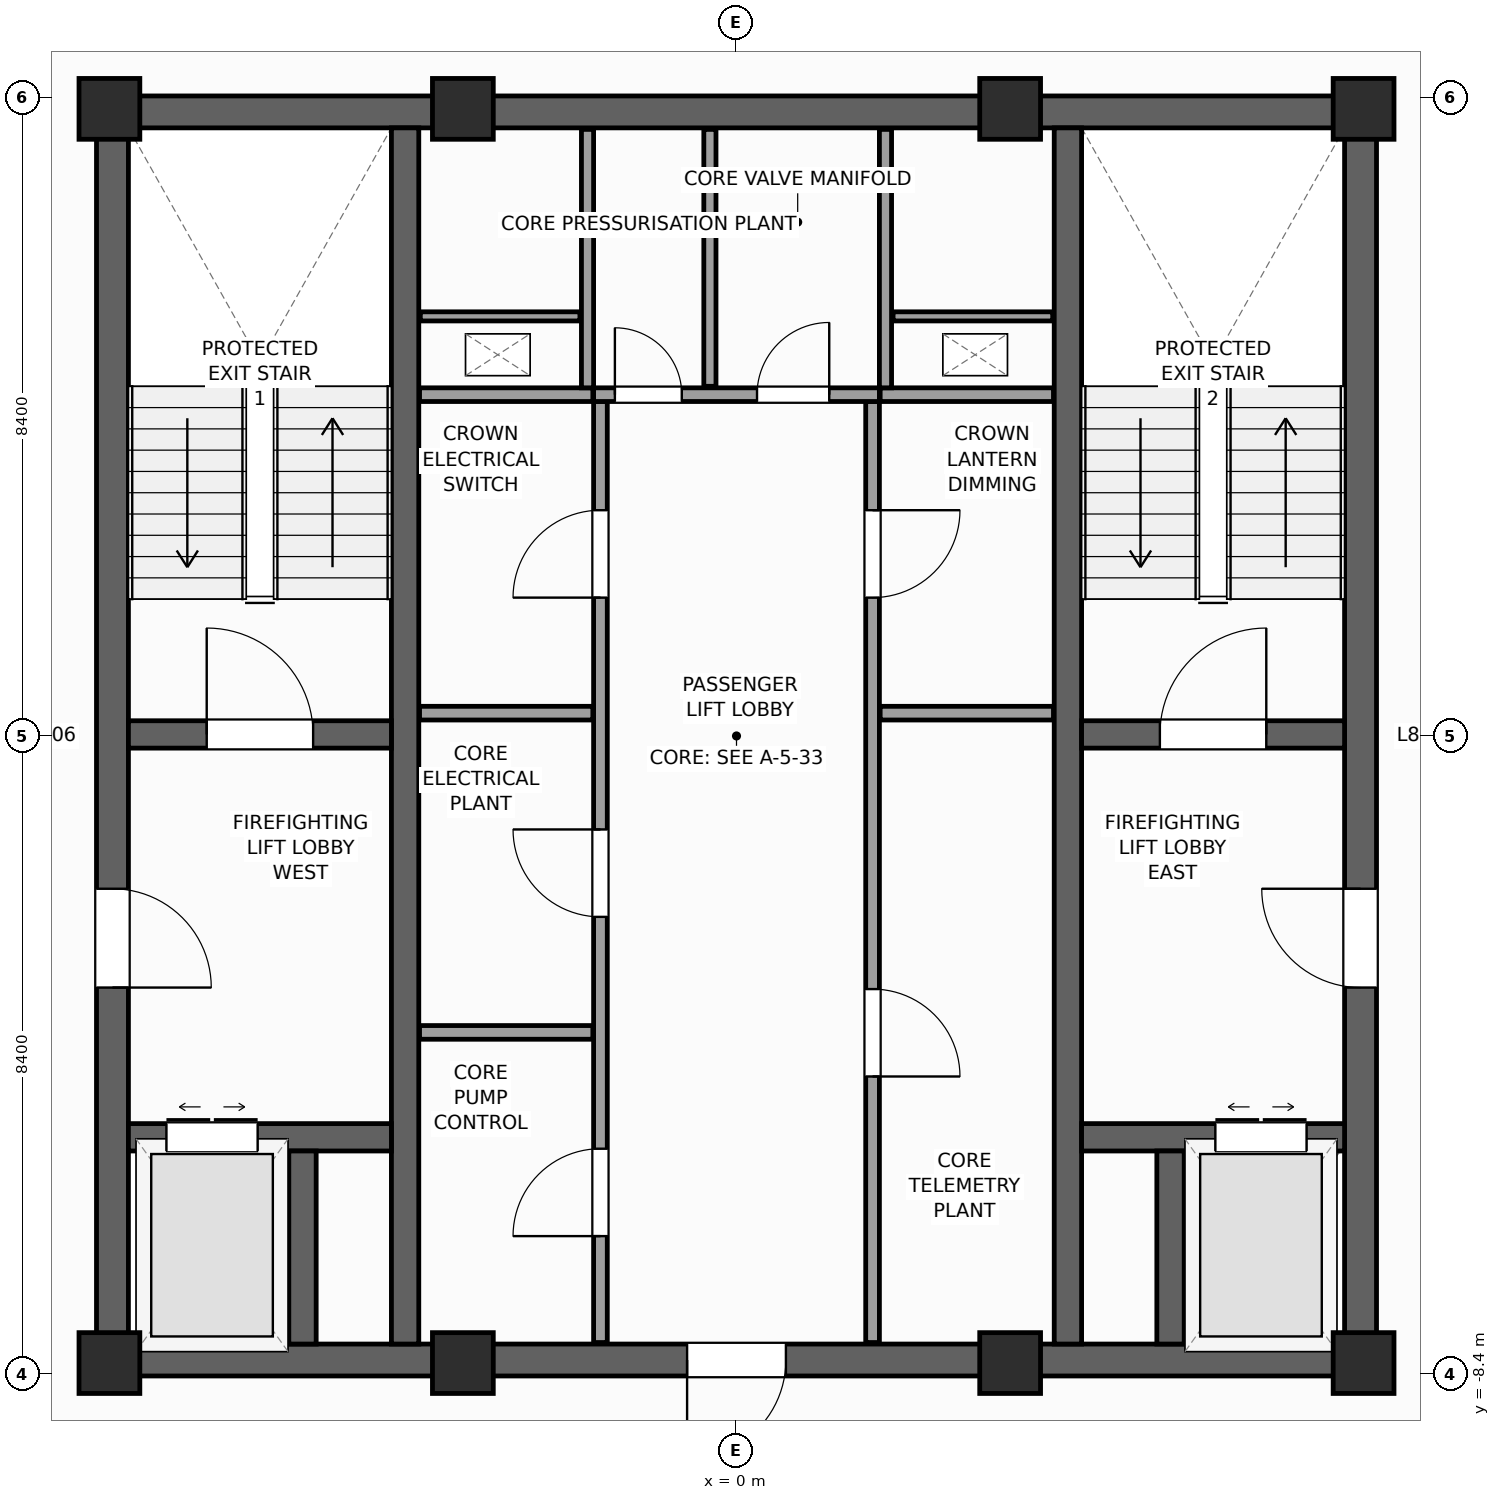
"""IFC4 building model, lengths in metres.
Left out: names, types, materials, properties, quantities, classifications, styles, units other than length and angle.
Written with IfcOpenShell. Run it as: python <this file> out.ifc"""

import sys

from ifc_helpers import new_model, si_unit, direction, frame, frame_2d, origin, origin_2d, place, context, subcontext, project, spatial, rectangle, extrude, source, transform, mapped, element, fill, save


model = new_model("IFC4")
c1 = context("Model", 3, precision=1e-05, world=origin(), true_north=direction((0.0, 1.0)))
c2 = subcontext(c1, "Body", "Model", "MODEL_VIEW")
j1 = project(units=[si_unit("LENGTHUNIT", "METRE"), si_unit("PLANEANGLEUNIT", "RADIAN")], contexts=[c1])
p1 = place(None, origin())
s1 = spatial("IfcSite", under=j1, at=p1, CompositionType="ELEMENT")
p2 = place(p1, origin())
s2 = spatial("IfcBuilding", under=s1, at=p2, CompositionType="ELEMENT")
p3 = place(p2, frame((0.0, 0.0, 325.6)))
s3 = spatial("IfcBuildingStorey", under=s2, at=p3, CompositionType="ELEMENT", Elevation=325.6)
p4 = place(p3, frame((-8.42, -8.21, 0.0), z_axis=(0.0, 0.0, 1.0), x_axis=(1.0, 0.0, 0.0)))
e1 = element("IfcWall", 1, at=p4, inside=s3, PredefinedType="SHEAR", context=c2, shape_type="SweptSolid", body=[
    extrude(rectangle(XDim=16.84, YDim=0.42, at=frame_2d((8.42, 0.0))), origin(), (0.0, 0.0, 1.0), 4.0),
])
p5 = place(p4, frame((7.77, 0.0, 0.0)))
e2 = element("IfcOpeningElement", 2, at=p5, cuts=e1, PredefinedType="OPENING", context=c2, shape_type="SweptSolid", body=[
    extrude(rectangle(XDim=1.3, YDim=2.2, at=frame_2d((0.65, 1.1))), frame((0.0, 0.22, 0.0), z_axis=(0.0, -1.0, 0.0), x_axis=(1.0, 0.0, 0.0)), (0.0, 0.0, 1.0), 0.44),
])
p6 = place(p3, frame((-8.42, 8.21, 0.0), z_axis=(0.0, 0.0, 1.0), x_axis=(1.0, 0.0, 0.0)))
e3 = element("IfcWall", 3, at=p6, inside=s3, PredefinedType="SHEAR", context=c2, shape_type="SweptSolid", body=[
    extrude(rectangle(XDim=16.84, YDim=0.42, at=frame_2d((8.42, 0.0))), origin(), (0.0, 0.0, 1.0), 4.0),
])
p7 = place(p3, frame((-8.21, -8.0, 0.0), z_axis=(0.0, 0.0, 1.0), x_axis=(0.0, 1.0, 0.0)))
e4 = element("IfcWall", 4, at=p7, inside=s3, PredefinedType="SHEAR", context=c2, shape_type="SweptSolid", body=[
    extrude(rectangle(XDim=16.0, YDim=0.42, at=frame_2d((8.0, 0.0))), origin(), (0.0, 0.0, 1.0), 4.0),
])
p8 = place(p7, frame((4.69, 0.0, 0.0)))
e5 = element("IfcOpeningElement", 5, at=p8, cuts=e4, PredefinedType="OPENING", context=c2, shape_type="SweptSolid", body=[
    extrude(rectangle(XDim=1.3, YDim=2.2, at=frame_2d((0.65, 1.1))), frame((0.0, 0.22, 0.0), z_axis=(0.0, -1.0, 0.0), x_axis=(1.0, 0.0, 0.0)), (0.0, 0.0, 1.0), 0.44),
])
p9 = place(p3, frame((8.21, -8.0, 0.0), z_axis=(0.0, 0.0, 1.0), x_axis=(0.0, 1.0, 0.0)))
e6 = element("IfcWall", 6, at=p9, inside=s3, PredefinedType="SHEAR", context=c2, shape_type="SweptSolid", body=[
    extrude(rectangle(XDim=16.0, YDim=0.42, at=frame_2d((8.0, 0.0))), origin(), (0.0, 0.0, 1.0), 4.0),
])
p10 = place(p9, frame((4.69, 0.0, 0.0)))
e7 = element("IfcOpeningElement", 7, at=p10, cuts=e6, PredefinedType="OPENING", context=c2, shape_type="SweptSolid", body=[
    extrude(rectangle(XDim=1.3, YDim=2.2, at=frame_2d((0.65, 1.1))), frame((0.0, 0.22, 0.0), z_axis=(0.0, -1.0, 0.0), x_axis=(1.0, 0.0, 0.0)), (0.0, 0.0, 1.0), 0.44),
])
for number, where, z_axis, x_axis in (
    (8, (-4.36, -8.0, 0.0), (0.0, 0.0, 1.0), (0.0, 1.0, 0.0)),
    (9, (4.36, -8.0, 0.0), (0.0, 0.0, 1.0), (0.0, 1.0, 0.0)),
):
    element("IfcWall", number, at=place(p3, frame(where, z_axis=z_axis, x_axis=x_axis)), inside=s3, PredefinedType="SHEAR", context=c2, shape_type="SweptSolid", body=[
        extrude(rectangle(XDim=16.0, YDim=0.36, at=frame_2d((8.0, 0.0))), origin(), (0.0, 0.0, 1.0), 4.0),
    ])
p11 = place(p3, frame((-8.0, 0.02, 0.0), z_axis=(0.0, 0.0, 1.0), x_axis=(1.0, 0.0, 0.0)))
e10 = element("IfcWall", 10, at=p11, inside=s3, PredefinedType="SHEAR", context=c2, shape_type="SweptSolid", body=[
    extrude(rectangle(XDim=3.46, YDim=0.36, at=frame_2d((1.73, 0.0))), origin(), (0.0, 0.0, 1.0), 4.0),
])
p12 = place(p11, frame((1.03, 0.0, 0.0)))
e11 = element("IfcOpeningElement", 11, at=p12, cuts=e10, PredefinedType="OPENING", context=c2, shape_type="SweptSolid", body=[
    extrude(rectangle(XDim=1.4, YDim=2.2, at=frame_2d((0.7, 1.1))), frame((0.0, 0.19, 0.0), z_axis=(0.0, -1.0, 0.0), x_axis=(1.0, 0.0, 0.0)), (0.0, 0.0, 1.0), 0.38),
])
p13 = place(p3, frame((4.54, 0.02, 0.0), z_axis=(0.0, 0.0, 1.0), x_axis=(1.0, 0.0, 0.0)))
e12 = element("IfcWall", 12, at=p13, inside=s3, PredefinedType="SHEAR", context=c2, shape_type="SweptSolid", body=[
    extrude(rectangle(XDim=3.46, YDim=0.36, at=frame_2d((1.73, 0.0))), origin(), (0.0, 0.0, 1.0), 4.0),
])
p14 = place(p13, frame((1.03, 0.0, 0.0)))
e13 = element("IfcOpeningElement", 13, at=p14, cuts=e12, PredefinedType="OPENING", context=c2, shape_type="SweptSolid", body=[
    extrude(rectangle(XDim=1.4, YDim=2.2, at=frame_2d((0.7, 1.1))), frame((0.0, 0.19, 0.0), z_axis=(0.0, -1.0, 0.0), x_axis=(1.0, 0.0, 0.0)), (0.0, 0.0, 1.0), 0.38),
])
p15 = place(p3, frame((-8.0, -5.28, 0.0), z_axis=(0.0, 0.0, 1.0), x_axis=(1.0, 0.0, 0.0)))
e14 = element("IfcWall", 14, at=p15, inside=s3, PredefinedType="SHEAR", context=c2, shape_type="SweptSolid", body=[
    extrude(rectangle(XDim=3.46, YDim=0.36, at=frame_2d((1.73, 0.0))), origin(), (0.0, 0.0, 1.0), 4.0),
])
p16 = place(p15, frame((0.5, 0.0, 0.0)))
e15 = element("IfcOpeningElement", 15, at=p16, cuts=e14, PredefinedType="OPENING", context=c2, shape_type="SweptSolid", body=[
    extrude(rectangle(XDim=1.2, YDim=2.25, at=frame_2d((0.6, 1.125))), frame((0.0, 0.19, 0.0), z_axis=(0.0, -1.0, 0.0), x_axis=(1.0, 0.0, 0.0)), (0.0, 0.0, 1.0), 0.38),
])
p17 = place(p3, frame((4.54, -5.28, 0.0), z_axis=(0.0, 0.0, 1.0), x_axis=(1.0, 0.0, 0.0)))
e16 = element("IfcWall", 16, at=p17, inside=s3, PredefinedType="SHEAR", context=c2, shape_type="SweptSolid", body=[
    extrude(rectangle(XDim=3.46, YDim=0.36, at=frame_2d((1.73, 0.0))), origin(), (0.0, 0.0, 1.0), 4.0),
])
p18 = place(p17, frame((1.76, 0.0, 0.0)))
e17 = element("IfcOpeningElement", 17, at=p18, cuts=e16, PredefinedType="OPENING", context=c2, shape_type="SweptSolid", body=[
    extrude(rectangle(XDim=1.2, YDim=2.25, at=frame_2d((0.6, 1.125))), frame((0.0, 0.19, 0.0), z_axis=(0.0, -1.0, 0.0), x_axis=(1.0, 0.0, 0.0)), (0.0, 0.0, 1.0), 0.38),
])
for number, where, z_axis, x_axis in (
    (18, (-5.71, -8.0, 0.0), (0.0, 0.0, 1.0), (0.0, 1.0, 0.0)),
    (19, (5.71, -8.0, 0.0), (0.0, 0.0, 1.0), (0.0, 1.0, 0.0)),
):
    element("IfcWall", number, at=place(p3, frame(where, z_axis=z_axis, x_axis=x_axis)), inside=s3, PredefinedType="SHEAR", context=c2, shape_type="SweptSolid", body=[
        extrude(rectangle(XDim=2.54, YDim=0.36, at=frame_2d((1.27, 0.0))), origin(), (0.0, 0.0, 1.0), 4.0),
    ])
m1 = source(origin(), c2, "Body", "SweptSolid", [
    extrude(rectangle(XDim=0.8, YDim=0.8, at=origin_2d()), origin(), (0.0, 0.0, 1.0), 4.0),
])
for number, where, z_axis, x_axis in (
    (20, (-8.25, -8.25, 0.0), (0.0, 0.0, 1.0), (1.0, 0.0, 0.0)),
    (21, (8.25, -8.25, 0.0), (0.0, 0.0, 1.0), (1.0, 0.0, 0.0)),
    (22, (8.25, 8.25, 0.0), (0.0, 0.0, 1.0), (1.0, 0.0, 0.0)),
    (23, (-8.25, 8.25, 0.0), (0.0, 0.0, 1.0), (1.0, 0.0, 0.0)),
    (24, (-3.6, -8.25, 0.0), (0.0, 0.0, 1.0), (1.0, 0.0, 0.0)),
    (25, (3.6, -8.25, 0.0), (0.0, 0.0, 1.0), (1.0, 0.0, 0.0)),
    (26, (-3.6, 8.25, 0.0), (0.0, 0.0, 1.0), (1.0, 0.0, 0.0)),
    (27, (3.6, 8.25, 0.0), (0.0, 0.0, 1.0), (1.0, 0.0, 0.0)),
):
    element("IfcColumn", number, at=place(p3, frame(where, z_axis=z_axis, x_axis=x_axis)), inside=s3, PredefinedType="PILASTER", context=c2, shape_type="MappedRepresentation", body=[
        mapped(m1, transform((0.0, 0.0, 0.0), scale=1.0)),
    ])
p19 = place(p3, frame((-1.79, -7.98, 0.0), z_axis=(0.0, 0.0, 1.0), x_axis=(0.0, 1.0, 0.0)))
e28 = element("IfcWall", 28, at=p19, inside=s3, PredefinedType="PARTITIONING", context=c2, shape_type="SweptSolid", body=[
    extrude(rectangle(XDim=12.38, YDim=0.18, at=frame_2d((6.19, 0.0))), origin(), (0.0, 0.0, 1.0), 3.7),
])
p20 = place(p19, frame((1.4, 0.0, 0.0)))
e29 = element("IfcOpeningElement", 29, at=p20, cuts=e28, PredefinedType="OPENING", context=c2, shape_type="SweptSolid", body=[
    extrude(rectangle(XDim=1.15, YDim=2.25, at=frame_2d((0.575, 1.125))), frame((0.0, 0.1, 0.0), z_axis=(0.0, -1.0, 0.0), x_axis=(1.0, 0.0, 0.0)), (0.0, 0.0, 1.0), 0.2),
])
p21 = place(p19, frame((5.6, 0.0, 0.0)))
e30 = element("IfcOpeningElement", 30, at=p21, cuts=e28, PredefinedType="OPENING", context=c2, shape_type="SweptSolid", body=[
    extrude(rectangle(XDim=1.15, YDim=2.25, at=frame_2d((0.575, 1.125))), frame((0.0, 0.1, 0.0), z_axis=(0.0, -1.0, 0.0), x_axis=(1.0, 0.0, 0.0)), (0.0, 0.0, 1.0), 0.2),
])
p22 = place(p19, frame((9.8, 0.0, 0.0)))
e31 = element("IfcOpeningElement", 31, at=p22, cuts=e28, PredefinedType="OPENING", context=c2, shape_type="SweptSolid", body=[
    extrude(rectangle(XDim=1.15, YDim=2.25, at=frame_2d((0.575, 1.125))), frame((0.0, 0.1, 0.0), z_axis=(0.0, -1.0, 0.0), x_axis=(1.0, 0.0, 0.0)), (0.0, 0.0, 1.0), 0.2),
])
p23 = place(p3, frame((1.79, -7.98, 0.0), z_axis=(0.0, 0.0, 1.0), x_axis=(0.0, 1.0, 0.0)))
e32 = element("IfcWall", 32, at=p23, inside=s3, PredefinedType="PARTITIONING", context=c2, shape_type="SweptSolid", body=[
    extrude(rectangle(XDim=12.38, YDim=0.18, at=frame_2d((6.19, 0.0))), origin(), (0.0, 0.0, 1.0), 3.7),
])
p24 = place(p23, frame((3.5, 0.0, 0.0)))
e33 = element("IfcOpeningElement", 33, at=p24, cuts=e32, PredefinedType="OPENING", context=c2, shape_type="SweptSolid", body=[
    extrude(rectangle(XDim=1.15, YDim=2.25, at=frame_2d((0.575, 1.125))), frame((0.0, 0.1, 0.0), z_axis=(0.0, -1.0, 0.0), x_axis=(1.0, 0.0, 0.0)), (0.0, 0.0, 1.0), 0.2),
])
p25 = place(p23, frame((9.8, 0.0, 0.0)))
e34 = element("IfcOpeningElement", 34, at=p25, cuts=e32, PredefinedType="OPENING", context=c2, shape_type="SweptSolid", body=[
    extrude(rectangle(XDim=1.15, YDim=2.25, at=frame_2d((0.575, 1.125))), frame((0.0, 0.1, 0.0), z_axis=(0.0, -1.0, 0.0), x_axis=(1.0, 0.0, 0.0)), (0.0, 0.0, 1.0), 0.2),
])
p26 = place(p3, frame((-1.88, 4.49, 0.0), z_axis=(0.0, 0.0, 1.0), x_axis=(1.0, 0.0, 0.0)))
e35 = element("IfcWall", 35, at=p26, inside=s3, PredefinedType="PARTITIONING", context=c2, shape_type="SweptSolid", body=[
    extrude(rectangle(XDim=3.76, YDim=0.18, at=frame_2d((1.88, 0.0))), origin(), (0.0, 0.0, 1.0), 3.7),
])
p27 = place(p26, frame((0.28, 0.0, 0.0)))
e36 = element("IfcOpeningElement", 36, at=p27, cuts=e35, PredefinedType="OPENING", context=c2, shape_type="SweptSolid", body=[
    extrude(rectangle(XDim=0.88, YDim=2.1, at=frame_2d((0.44, 1.05))), frame((0.0, 0.1, 0.0), z_axis=(0.0, -1.0, 0.0), x_axis=(1.0, 0.0, 0.0)), (0.0, 0.0, 1.0), 0.2),
])
p28 = place(p26, frame((2.15, 0.0, 0.0)))
e37 = element("IfcOpeningElement", 37, at=p28, cuts=e35, PredefinedType="OPENING", context=c2, shape_type="SweptSolid", body=[
    extrude(rectangle(XDim=0.95, YDim=2.1, at=frame_2d((0.475, 1.05))), frame((0.0, 0.1, 0.0), z_axis=(0.0, -1.0, 0.0), x_axis=(1.0, 0.0, 0.0)), (0.0, 0.0, 1.0), 0.2),
])
for number, where, z_axis, x_axis in (
    (38, (-4.17, -3.9, 0.0), (0.0, 0.0, 1.0), (1.0, 0.0, 0.0)),
    (39, (-4.17, 0.3, 0.0), (0.0, 0.0, 1.0), (1.0, 0.0, 0.0)),
    (40, (1.89, 0.3, 0.0), (0.0, 0.0, 1.0), (1.0, 0.0, 0.0)),
    (41, (-4.17, 4.49, 0.0), (0.0, 0.0, 1.0), (1.0, 0.0, 0.0)),
    (42, (1.89, 4.49, 0.0), (0.0, 0.0, 1.0), (1.0, 0.0, 0.0)),
):
    element("IfcWall", number, at=place(p3, frame(where, z_axis=z_axis, x_axis=x_axis)), inside=s3, PredefinedType="PARTITIONING", context=c2, shape_type="SweptSolid", body=[
        extrude(rectangle(XDim=2.28, YDim=0.18, at=frame_2d((1.14, 0.0))), origin(), (0.0, 0.0, 1.0), 3.7),
    ])
for number, where, z_axis, x_axis in (
    (43, (-1.96, 4.58, 0.0), (0.0, 0.0, 1.0), (0.0, 1.0, 0.0)),
    (44, (1.96, 4.58, 0.0), (0.0, 0.0, 1.0), (0.0, 1.0, 0.0)),
):
    element("IfcWall", number, at=place(p3, frame(where, z_axis=z_axis, x_axis=x_axis)), inside=s3, PredefinedType="PARTITIONING", context=c2, shape_type="SweptSolid", body=[
        extrude(rectangle(XDim=3.4, YDim=0.16, at=frame_2d((1.7, 0.0))), origin(), (0.0, 0.0, 1.0), 3.7),
    ])
for number, where, z_axis, x_axis in (
    (45, (-4.16, 5.52, 0.0), (0.0, 0.0, 1.0), (1.0, 0.0, 0.0)),
    (46, (2.06, 5.52, 0.0), (0.0, 0.0, 1.0), (1.0, 0.0, 0.0)),
):
    element("IfcWall", number, at=place(p3, frame(where, z_axis=z_axis, x_axis=x_axis)), inside=s3, PredefinedType="PARTITIONING", context=c2, shape_type="SweptSolid", body=[
        extrude(rectangle(XDim=2.1, YDim=0.12, at=frame_2d((1.05, 0.0))), origin(), (0.0, 0.0, 1.0), 3.7),
    ])
p29 = place(p3, frame((-0.35, 4.6, 0.0), z_axis=(0.0, 0.0, 1.0), x_axis=(0.0, 1.0, 0.0)))
e47 = element("IfcWall", 47, at=p29, inside=s3, PredefinedType="PARTITIONING", context=c2, shape_type="SweptSolid", body=[
    extrude(rectangle(XDim=3.38, YDim=0.16, at=frame_2d((1.69, 0.0))), origin(), (0.0, 0.0, 1.0), 3.7),
])
m2 = source(origin(), c2, "Body", "SweptSolid", [
    extrude(rectangle(XDim=1.4, YDim=2.2, at=frame_2d((0.7, 1.1))), frame((0.0, 0.025, 0.0), z_axis=(0.0, -1.0, 0.0), x_axis=(1.0, 0.0, 0.0)), (0.0, 0.0, 1.0), 0.05),
])
p30 = place(p12, origin())
e48 = element("IfcDoor", 48, at=p30, inside=s3, OperationType="SINGLE_SWING_LEFT", PredefinedType="DOOR", context=c2, shape_type="MappedRepresentation", body=[
    mapped(m2, transform((0.0, 0.0, 0.0), scale=1.0)),
])
fill(e11, e48)
p31 = place(p14, origin())
e49 = element("IfcDoor", 49, at=p31, inside=s3, OperationType="SINGLE_SWING_RIGHT", PredefinedType="DOOR", context=c2, shape_type="MappedRepresentation", body=[
    mapped(m2, transform((0.0, 0.0, 0.0), scale=1.0)),
])
fill(e13, e49)
m3 = source(origin(), c2, "Body", "SweptSolid", [
    extrude(rectangle(XDim=1.3, YDim=2.2, at=frame_2d((0.65, 1.1))), frame((0.0, 0.025, 0.0), z_axis=(0.0, -1.0, 0.0), x_axis=(1.0, 0.0, 0.0)), (0.0, 0.0, 1.0), 0.05),
])
p32 = place(p8, frame((1.3, 0.0, 0.0), z_axis=(0.0, 0.0, 1.0), x_axis=(-1.0, 0.0, 0.0)))
e50 = element("IfcDoor", 50, at=p32, inside=s3, OperationType="SINGLE_SWING_LEFT", PredefinedType="DOOR", context=c2, shape_type="MappedRepresentation", body=[
    mapped(m3, transform((0.0, 0.0, 0.0), scale=1.0)),
])
fill(e5, e50)
p33 = place(p10, origin())
e51 = element("IfcDoor", 51, at=p33, inside=s3, OperationType="SINGLE_SWING_RIGHT", PredefinedType="DOOR", context=c2, shape_type="MappedRepresentation", body=[
    mapped(m3, transform((0.0, 0.0, 0.0), scale=1.0)),
])
fill(e7, e51)
p34 = place(p5, frame((1.3, 0.0, 0.0), z_axis=(0.0, 0.0, 1.0), x_axis=(-1.0, 0.0, 0.0)))
e52 = element("IfcDoor", 52, at=p34, inside=s3, OperationType="SINGLE_SWING_LEFT", PredefinedType="DOOR", context=c2, shape_type="MappedRepresentation", body=[
    mapped(m3, transform((0.0, 0.0, 0.0), scale=1.0)),
])
fill(e2, e52)
m4 = source(origin(), c2, "Body", "SweptSolid", [
    extrude(rectangle(XDim=1.2, YDim=2.25, at=frame_2d((0.6, 1.125))), frame((0.0, 0.025, 0.0), z_axis=(0.0, -1.0, 0.0), x_axis=(1.0, 0.0, 0.0)), (0.0, 0.0, 1.0), 0.05),
])
p35 = place(p16, origin())
e53 = element("IfcDoor", 53, at=p35, inside=s3, OperationType="DOUBLE_DOOR_SLIDING", PredefinedType="DOOR", context=c2, shape_type="MappedRepresentation", body=[
    mapped(m4, transform((0.0, 0.0, 0.0), scale=1.0)),
])
fill(e15, e53)
p36 = place(p18, origin())
e54 = element("IfcDoor", 54, at=p36, inside=s3, OperationType="DOUBLE_DOOR_SLIDING", PredefinedType="DOOR", context=c2, shape_type="MappedRepresentation", body=[
    mapped(m4, transform((0.0, 0.0, 0.0), scale=1.0)),
])
fill(e17, e54)
m5 = source(origin(), c2, "Body", "SweptSolid", [
    extrude(rectangle(XDim=1.15, YDim=2.25, at=frame_2d((0.575, 1.125))), frame((0.0, 0.025, 0.0), z_axis=(0.0, -1.0, 0.0), x_axis=(1.0, 0.0, 0.0)), (0.0, 0.0, 1.0), 0.05),
])
p37 = place(p20, origin())
e55 = element("IfcDoor", 55, at=p37, inside=s3, OperationType="SINGLE_SWING_LEFT", PredefinedType="DOOR", context=c2, shape_type="MappedRepresentation", body=[
    mapped(m5, transform((0.0, 0.0, 0.0), scale=1.0)),
])
fill(e29, e55)
p38 = place(p21, origin())
e56 = element("IfcDoor", 56, at=p38, inside=s3, OperationType="SINGLE_SWING_RIGHT", PredefinedType="DOOR", context=c2, shape_type="MappedRepresentation", body=[
    mapped(m5, transform((0.0, 0.0, 0.0), scale=1.0)),
])
fill(e30, e56)
p39 = place(p24, frame((1.15, 0.0, 0.0), z_axis=(0.0, 0.0, 1.0), x_axis=(-1.0, 0.0, 0.0)))
e57 = element("IfcDoor", 57, at=p39, inside=s3, OperationType="SINGLE_SWING_LEFT", PredefinedType="DOOR", context=c2, shape_type="MappedRepresentation", body=[
    mapped(m5, transform((0.0, 0.0, 0.0), scale=1.0)),
])
fill(e33, e57)
p40 = place(p22, origin())
e58 = element("IfcDoor", 58, at=p40, inside=s3, OperationType="SINGLE_SWING_LEFT", PredefinedType="DOOR", context=c2, shape_type="MappedRepresentation", body=[
    mapped(m5, transform((0.0, 0.0, 0.0), scale=1.0)),
])
fill(e31, e58)
p41 = place(p25, frame((1.15, 0.0, 0.0), z_axis=(0.0, 0.0, 1.0), x_axis=(-1.0, 0.0, 0.0)))
e59 = element("IfcDoor", 59, at=p41, inside=s3, OperationType="SINGLE_SWING_RIGHT", PredefinedType="DOOR", context=c2, shape_type="MappedRepresentation", body=[
    mapped(m5, transform((0.0, 0.0, 0.0), scale=1.0)),
])
fill(e34, e59)
m6 = source(origin(), c2, "Body", "SweptSolid", [
    extrude(rectangle(XDim=0.88, YDim=2.1, at=frame_2d((0.44, 1.05))), frame((0.0, 0.025, 0.0), z_axis=(0.0, -1.0, 0.0), x_axis=(1.0, 0.0, 0.0)), (0.0, 0.0, 1.0), 0.05),
])
p42 = place(p27, origin())
e60 = element("IfcDoor", 60, at=p42, inside=s3, OperationType="SINGLE_SWING_LEFT", PredefinedType="DOOR", context=c2, shape_type="MappedRepresentation", body=[
    mapped(m6, transform((0.0, 0.0, 0.0), scale=1.0)),
])
fill(e36, e60)
m7 = source(origin(), c2, "Body", "SweptSolid", [
    extrude(rectangle(XDim=0.95, YDim=2.1, at=frame_2d((0.475, 1.05))), frame((0.0, 0.025, 0.0), z_axis=(0.0, -1.0, 0.0), x_axis=(1.0, 0.0, 0.0)), (0.0, 0.0, 1.0), 0.05),
])
p43 = place(p28, origin())
e61 = element("IfcDoor", 61, at=p43, inside=s3, OperationType="SINGLE_SWING_RIGHT", PredefinedType="DOOR", context=c2, shape_type="MappedRepresentation", body=[
    mapped(m7, transform((0.0, 0.0, 0.0), scale=1.0)),
])
fill(e37, e61)
save(model, sys.argv[1])
